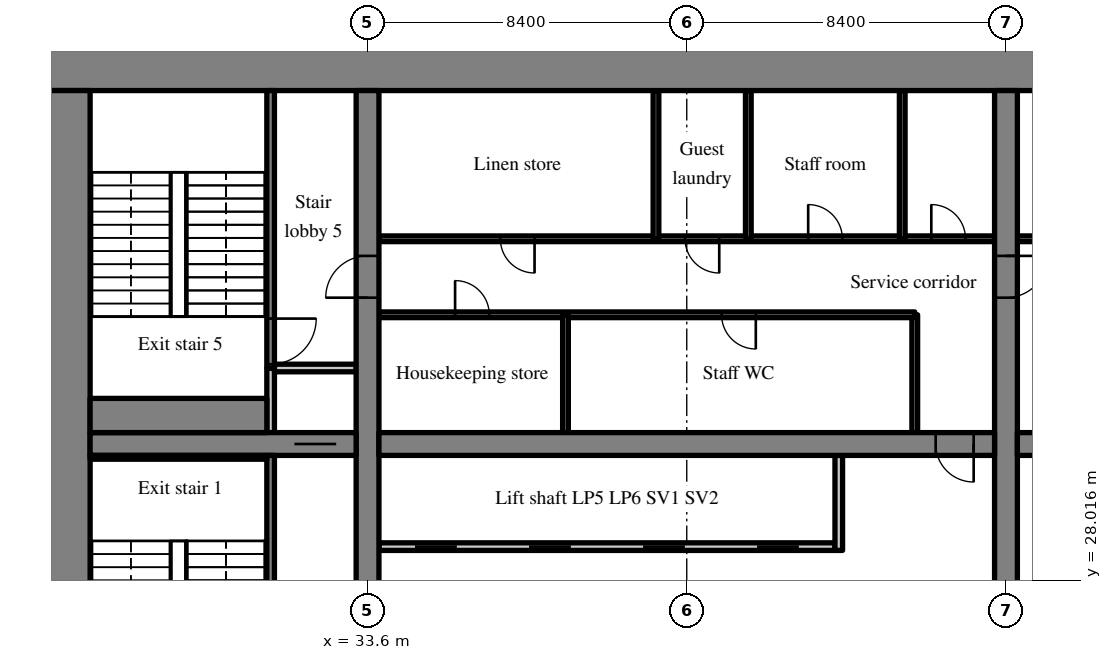
"""IFC4 building model, lengths in metres.
Left out: names, types, materials, properties, quantities, classifications, styles, units other than length and angle.
Written with IfcOpenShell. Run it as: python <this file> out.ifc"""

import sys

from ifc_helpers import new_model, si_unit, direction, frame, frame_2d, origin, place, context, subcontext, project, spatial, rectangle, extrude, source, transform, mapped, element, fill, save


model = new_model("IFC4")
c1 = context("Model", 3, precision=1e-05, world=origin(), true_north=direction((0.0, 1.0)))
c2 = subcontext(c1, "Body", "Model", "MODEL_VIEW")
j1 = project(units=[si_unit("LENGTHUNIT", "METRE"), si_unit("PLANEANGLEUNIT", "RADIAN")], contexts=[c1])
p1 = place(None, origin())
s1 = spatial("IfcSite", under=j1, at=p1, CompositionType="ELEMENT")
p2 = place(p1, origin())
s2 = spatial("IfcBuilding", under=s1, at=p2, CompositionType="ELEMENT")
p3 = place(p2, frame((0.0, 0.0, 18.0)))
s3 = spatial("IfcBuildingStorey", under=s2, at=p3, CompositionType="ELEMENT", Elevation=18.0)
m1 = source(origin(), c2, "Body", "SweptSolid", [
    extrude(rectangle(XDim=50.4, YDim=1.1, at=frame_2d((25.2, 0.0))), origin(), (0.0, 0.0, 1.0), 4.72),
])
p4 = place(p3, frame((25.2, 41.45, 0.0), z_axis=(0.0, 0.0, 1.0), x_axis=(1.0, 0.0, 0.0)))
e1 = element("IfcWall", 1, at=p4, inside=s3, PredefinedType="SHEAR", context=c2, shape_type="MappedRepresentation", body=[
    mapped(m1, transform((0.0, 0.0, 0.0), scale=1.0)),
])
m2 = source(origin(), c2, "Body", "SweptSolid", [
    extrude(rectangle(XDim=17.8, YDim=1.1, at=frame_2d((8.9, 0.0))), origin(), (0.0, 0.0, 1.0), 4.72),
])
p5 = place(p3, frame((25.75, 23.1, 0.0), z_axis=(0.0, 0.0, 1.0), x_axis=(0.0, 1.0, 0.0)))
e2 = element("IfcWall", 2, at=p5, inside=s3, PredefinedType="SHEAR", context=c2, shape_type="MappedRepresentation", body=[
    mapped(m2, transform((0.0, 0.0, 0.0), scale=1.0)),
])
m3 = source(origin(), c2, "Body", "SweptSolid", [
    extrude(rectangle(XDim=17.8, YDim=0.6, at=frame_2d((8.9, 0.0))), origin(), (0.0, 0.0, 1.0), 4.72),
])
p6 = place(p3, frame((33.6, 23.1, 0.0), z_axis=(0.0, 0.0, 1.0), x_axis=(0.0, 1.0, 0.0)))
e3 = element("IfcWall", 3, at=p6, inside=s3, PredefinedType="SHEAR", context=c2, shape_type="MappedRepresentation", body=[
    mapped(m3, transform((0.0, 0.0, 0.0), scale=1.0)),
])
m4 = source(origin(), c2, "Body", "SweptSolid", [
    extrude(rectangle(XDim=1.1, YDim=2.1, at=frame_2d((0.55, 1.05))), frame((0.0, 0.31, 0.0), z_axis=(0.0, -1.0, 0.0), x_axis=(1.0, 0.0, 0.0)), (0.0, 0.0, 1.0), 0.62),
])
p7 = place(p6, frame((12.35, 0.0, 0.0)))
e4 = element("IfcOpeningElement", 4, at=p7, cuts=e3, PredefinedType="OPENING", context=c2, shape_type="MappedRepresentation", body=[
    mapped(m4, transform((0.0, 0.0, 0.0), scale=1.0)),
])
p8 = place(p3, frame((50.4, 23.1, 0.0), z_axis=(0.0, 0.0, 1.0), x_axis=(0.0, 1.0, 0.0)))
e5 = element("IfcWall", 5, at=p8, inside=s3, PredefinedType="SHEAR", context=c2, shape_type="MappedRepresentation", body=[
    mapped(m3, transform((0.0, 0.0, 0.0), scale=1.0)),
])
p9 = place(p8, frame((12.35, 0.0, 0.0)))
e6 = element("IfcOpeningElement", 6, at=p9, cuts=e5, PredefinedType="OPENING", context=c2, shape_type="MappedRepresentation", body=[
    mapped(m4, transform((0.0, 0.0, 0.0), scale=1.0)),
])
m5 = source(origin(), c2, "Body", "SweptSolid", [
    extrude(rectangle(XDim=7.0, YDim=0.6, at=frame_2d((3.5, 0.0))), origin(), (0.0, 0.0, 1.0), 4.72),
])
p10 = place(p3, frame((26.3, 31.6, 0.0), z_axis=(0.0, 0.0, 1.0), x_axis=(1.0, 0.0, 0.0)))
e7 = element("IfcWall", 7, at=p10, inside=s3, PredefinedType="SHEAR", context=c2, shape_type="MappedRepresentation", body=[
    mapped(m5, transform((0.0, 0.0, 0.0), scale=1.0)),
])
p11 = place(p10, frame((5.375, 0.0, 0.0)))
e8 = element("IfcOpeningElement", 8, at=p11, cuts=e7, PredefinedType="OPENING", context=c2, shape_type="MappedRepresentation", body=[
    mapped(m4, transform((0.0, 0.0, 0.0), scale=1.0)),
])
m6 = source(origin(), c2, "Body", "SweptSolid", [
    extrude(rectangle(XDim=16.2, YDim=0.6, at=frame_2d((8.1, 0.0))), origin(), (0.0, 0.0, 1.0), 4.72),
])
p12 = place(p3, frame((33.9, 31.6, 0.0), z_axis=(0.0, 0.0, 1.0), x_axis=(1.0, 0.0, 0.0)))
e9 = element("IfcWall", 9, at=p12, inside=s3, PredefinedType="SHEAR", context=c2, shape_type="MappedRepresentation", body=[
    mapped(m6, transform((0.0, 0.0, 0.0), scale=1.0)),
])
m7 = source(origin(), c2, "Body", "SweptSolid", [
    extrude(rectangle(XDim=1.0, YDim=2.1, at=frame_2d((0.5, 1.05))), frame((0.0, 0.31, 0.0), z_axis=(0.0, -1.0, 0.0), x_axis=(1.0, 0.0, 0.0)), (0.0, 0.0, 1.0), 0.62),
])
p13 = place(p12, frame((14.65, 0.0, 0.0)))
e10 = element("IfcOpeningElement", 10, at=p13, cuts=e9, PredefinedType="OPENING", context=c2, shape_type="MappedRepresentation", body=[
    mapped(m7, transform((0.0, 0.0, 0.0), scale=1.0)),
])
m8 = source(origin(), c2, "Body", "SweptSolid", [
    extrude(rectangle(XDim=16.2, YDim=0.6, at=frame_2d((8.1, 0.0))), origin(), (0.0, 0.0, 1.0), 4.72),
])
p14 = place(p3, frame((50.7, 31.6, 0.0), z_axis=(0.0, 0.0, 1.0), x_axis=(1.0, 0.0, 0.0)))
e11 = element("IfcWall", 11, at=p14, inside=s3, PredefinedType="SHEAR", context=c2, shape_type="MappedRepresentation", body=[
    mapped(m8, transform((0.0, 0.0, 0.0), scale=1.0)),
])
p15 = place(p14, frame((0.55, 0.0, 0.0)))
e12 = element("IfcOpeningElement", 12, at=p15, cuts=e11, PredefinedType="OPENING", context=c2, shape_type="MappedRepresentation", body=[
    mapped(m7, transform((0.0, 0.0, 0.0), scale=1.0)),
])
m9 = source(origin(), c2, "Body", "SweptSolid", [
    extrude(rectangle(XDim=12.0, YDim=0.2, at=frame_2d((6.0, 0.0))), origin(), (0.0, 0.0, 1.0), 4.72),
])
p16 = place(p3, frame((33.9, 28.9, 0.0), z_axis=(0.0, 0.0, 1.0), x_axis=(1.0, 0.0, 0.0)))
e13 = element("IfcWall", 13, at=p16, inside=s3, PredefinedType="SOLIDWALL", context=c2, shape_type="MappedRepresentation", body=[
    mapped(m9, transform((0.0, 0.0, 0.0), scale=1.0)),
])
m10 = source(origin(), c2, "Body", "SweptSolid", [
    extrude(rectangle(XDim=1.1, YDim=2.1, at=frame_2d((0.55, 1.05))), frame((0.0, 0.11, 0.0), z_axis=(0.0, -1.0, 0.0), x_axis=(1.0, 0.0, 0.0)), (0.0, 0.0, 1.0), 0.22),
])
p17 = place(p16, frame((0.95, 0.0, 0.0)))
e14 = element("IfcOpeningElement", 14, at=p17, cuts=e13, PredefinedType="OPENING", context=c2, shape_type="MappedRepresentation", body=[
    mapped(m10, transform((0.0, 0.0, 0.0), scale=1.0)),
])
p18 = place(p16, frame((3.95, 0.0, 0.0)))
e15 = element("IfcOpeningElement", 15, at=p18, cuts=e13, PredefinedType="OPENING", context=c2, shape_type="MappedRepresentation", body=[
    mapped(m10, transform((0.0, 0.0, 0.0), scale=1.0)),
])
p19 = place(p16, frame((6.95, 0.0, 0.0)))
e16 = element("IfcOpeningElement", 16, at=p19, cuts=e13, PredefinedType="OPENING", context=c2, shape_type="MappedRepresentation", body=[
    mapped(m10, transform((0.0, 0.0, 0.0), scale=1.0)),
])
p20 = place(p16, frame((9.95, 0.0, 0.0)))
e17 = element("IfcOpeningElement", 17, at=p20, cuts=e13, PredefinedType="OPENING", context=c2, shape_type="MappedRepresentation", body=[
    mapped(m10, transform((0.0, 0.0, 0.0), scale=1.0)),
])
m11 = source(origin(), c2, "Body", "SweptSolid", [
    extrude(rectangle(XDim=2.5, YDim=0.2, at=frame_2d((1.25, 0.0))), origin(), (0.0, 0.0, 1.0), 4.72),
])
p21 = place(p3, frame((46.0, 28.8, 0.0), z_axis=(0.0, 0.0, 1.0), x_axis=(0.0, 1.0, 0.0)))
e18 = element("IfcWall", 18, at=p21, inside=s3, PredefinedType="SOLIDWALL", context=c2, shape_type="MappedRepresentation", body=[
    mapped(m11, transform((0.0, 0.0, 0.0), scale=1.0)),
])
m12 = source(origin(), c2, "Body", "SweptSolid", [
    extrude(rectangle(XDim=3.1, YDim=0.15, at=frame_2d((1.55, 0.0))), origin(), (0.0, 0.0, 1.0), 4.72),
])
p22 = place(p3, frame((48.0, 31.9, 0.0), z_axis=(0.0, 0.0, 1.0), x_axis=(0.0, 1.0, 0.0)))
e19 = element("IfcWall", 19, at=p22, inside=s3, PredefinedType="PARTITIONING", context=c2, shape_type="MappedRepresentation", body=[
    mapped(m12, transform((0.0, 0.0, 0.0), scale=1.0)),
])
m13 = source(origin(), c2, "Body", "SweptSolid", [
    extrude(rectangle(XDim=14.1, YDim=0.15, at=frame_2d((7.05, 0.0))), origin(), (0.0, 0.0, 1.0), 4.72),
])
p23 = place(p3, frame((33.9, 35.0, 0.0), z_axis=(0.0, 0.0, 1.0), x_axis=(1.0, 0.0, 0.0)))
e20 = element("IfcWall", 20, at=p23, inside=s3, PredefinedType="PARTITIONING", context=c2, shape_type="MappedRepresentation", body=[
    mapped(m13, transform((0.0, 0.0, 0.0), scale=1.0)),
])
m14 = source(origin(), c2, "Body", "SweptSolid", [
    extrude(rectangle(XDim=0.9, YDim=2.1, at=frame_2d((0.45, 1.05))), frame((0.0, 0.085, 0.0), z_axis=(0.0, -1.0, 0.0), x_axis=(1.0, 0.0, 0.0)), (0.0, 0.0, 1.0), 0.17),
])
p24 = place(p23, frame((2.004, 0.0, 0.0)))
e21 = element("IfcOpeningElement", 21, at=p24, cuts=e20, PredefinedType="OPENING", context=c2, shape_type="MappedRepresentation", body=[
    mapped(m14, transform((0.0, 0.0, 0.0), scale=1.0)),
])
p25 = place(p23, frame((9.017, 0.0, 0.0)))
e22 = element("IfcOpeningElement", 22, at=p25, cuts=e20, PredefinedType="OPENING", context=c2, shape_type="MappedRepresentation", body=[
    mapped(m14, transform((0.0, 0.0, 0.0), scale=1.0)),
])
m15 = source(origin(), c2, "Body", "SweptSolid", [
    extrude(rectangle(XDim=16.2, YDim=0.15, at=frame_2d((8.1, 0.0))), origin(), (0.0, 0.0, 1.0), 4.72),
])
p26 = place(p3, frame((33.9, 37.0, 0.0), z_axis=(0.0, 0.0, 1.0), x_axis=(1.0, 0.0, 0.0)))
e23 = element("IfcWall", 23, at=p26, inside=s3, PredefinedType="PARTITIONING", context=c2, shape_type="MappedRepresentation", body=[
    mapped(m15, transform((0.0, 0.0, 0.0), scale=1.0)),
])
p27 = place(p26, frame((3.195, 0.0, 0.0)))
e24 = element("IfcOpeningElement", 24, at=p27, cuts=e23, PredefinedType="OPENING", context=c2, shape_type="MappedRepresentation", body=[
    mapped(m14, transform((0.0, 0.0, 0.0), scale=1.0)),
])
p28 = place(p26, frame((8.055, 0.0, 0.0)))
e25 = element("IfcOpeningElement", 25, at=p28, cuts=e23, PredefinedType="OPENING", context=c2, shape_type="MappedRepresentation", body=[
    mapped(m14, transform((0.0, 0.0, 0.0), scale=1.0)),
])
p29 = place(p26, frame((11.295, 0.0, 0.0)))
e26 = element("IfcOpeningElement", 26, at=p29, cuts=e23, PredefinedType="OPENING", context=c2, shape_type="MappedRepresentation", body=[
    mapped(m14, transform((0.0, 0.0, 0.0), scale=1.0)),
])
p30 = place(p26, frame((14.535, 0.0, 0.0)))
e27 = element("IfcOpeningElement", 27, at=p30, cuts=e23, PredefinedType="OPENING", context=c2, shape_type="MappedRepresentation", body=[
    mapped(m14, transform((0.0, 0.0, 0.0), scale=1.0)),
])
p31 = place(p3, frame((38.809, 31.9, 0.0), z_axis=(0.0, 0.0, 1.0), x_axis=(0.0, 1.0, 0.0)))
e28 = element("IfcWall", 28, at=p31, inside=s3, PredefinedType="PARTITIONING", context=c2, shape_type="MappedRepresentation", body=[
    mapped(m12, transform((0.0, 0.0, 0.0), scale=1.0)),
])
m16 = source(origin(), c2, "Body", "SweptSolid", [
    extrude(rectangle(XDim=3.9, YDim=0.15, at=frame_2d((1.95, 0.0))), origin(), (0.0, 0.0, 1.0), 4.72),
])
for number, where, z_axis, x_axis in (
    (29, (41.19, 37.0, 0.0), (0.0, 0.0, 1.0), (0.0, 1.0, 0.0)),
    (30, (43.62, 37.0, 0.0), (0.0, 0.0, 1.0), (0.0, 1.0, 0.0)),
    (31, (47.67, 37.0, 0.0), (0.0, 0.0, 1.0), (0.0, 1.0, 0.0)),
):
    element("IfcWall", number, at=place(p3, frame(where, z_axis=z_axis, x_axis=x_axis)), inside=s3, PredefinedType="PARTITIONING", context=c2, shape_type="MappedRepresentation", body=[
        mapped(m16, transform((0.0, 0.0, 0.0), scale=1.0)),
    ])
m17 = source(origin(), c2, "Body", "SweptSolid", [
    extrude(rectangle(XDim=16.2, YDim=0.15, at=frame_2d((8.1, 0.0))), origin(), (0.0, 0.0, 1.0), 4.72),
])
p32 = place(p3, frame((66.9, 37.0, 0.0), z_axis=(0.0, 0.0, 1.0), x_axis=(-1.0, 0.0, 0.0)))
e32 = element("IfcWall", 32, at=p32, inside=s3, PredefinedType="PARTITIONING", context=c2, shape_type="MappedRepresentation", body=[
    mapped(m17, transform((0.0, 0.0, 0.0), scale=1.0)),
])
p33 = place(p32, frame((0.765, 0.0, 0.0)))
e33 = element("IfcOpeningElement", 33, at=p33, cuts=e32, PredefinedType="OPENING", context=c2, shape_type="MappedRepresentation", body=[
    mapped(m14, transform((0.0, 0.0, 0.0), scale=1.0)),
])
p34 = place(p32, frame((3.6, 0.0, 0.0)))
e34 = element("IfcOpeningElement", 34, at=p34, cuts=e32, PredefinedType="OPENING", context=c2, shape_type="MappedRepresentation", body=[
    mapped(m14, transform((0.0, 0.0, 0.0), scale=1.0)),
])
p35 = place(p32, frame((9.27, 0.0, 0.0)))
e35 = element("IfcOpeningElement", 35, at=p35, cuts=e32, PredefinedType="OPENING", context=c2, shape_type="MappedRepresentation", body=[
    mapped(m14, transform((0.0, 0.0, 0.0), scale=1.0)),
])
p36 = place(p32, frame((14.535, 0.0, 0.0)))
e36 = element("IfcOpeningElement", 36, at=p36, cuts=e32, PredefinedType="OPENING", context=c2, shape_type="MappedRepresentation", body=[
    mapped(m14, transform((0.0, 0.0, 0.0), scale=1.0)),
])
m18 = source(origin(), c2, "Body", "SweptSolid", [
    extrude(rectangle(XDim=8.2, YDim=0.2, at=frame_2d((4.1, 0.0))), origin(), (0.0, 0.0, 1.0), 4.72),
])
p37 = place(p3, frame((31.05, 23.1, 0.0), z_axis=(0.0, 0.0, 1.0), x_axis=(0.0, 1.0, 0.0)))
e37 = element("IfcWall", 37, at=p37, inside=s3, PredefinedType="SOLIDWALL", context=c2, shape_type="MappedRepresentation", body=[
    mapped(m18, transform((0.0, 0.0, 0.0), scale=1.0)),
])
m19 = source(origin(), c2, "Body", "SweptSolid", [
    extrude(rectangle(XDim=1.2, YDim=2.1, at=frame_2d((0.6, 1.05))), frame((0.0, 0.11, 0.0), z_axis=(0.0, -1.0, 0.0), x_axis=(1.0, 0.0, 0.0)), (0.0, 0.0, 1.0), 0.22),
])
p38 = place(p37, frame((0.5, 0.0, 0.0)))
e38 = element("IfcOpeningElement", 38, at=p38, cuts=e37, PredefinedType="OPENING", context=c2, shape_type="MappedRepresentation", body=[
    mapped(m19, transform((0.0, 0.0, 0.0), scale=1.0)),
])
m20 = source(origin(), c2, "Body", "SweptSolid", [
    extrude(rectangle(XDim=1.7, YDim=0.2, at=frame_2d((0.85, 0.0))), origin(), (0.0, 0.0, 1.0), 4.72),
])
p39 = place(p3, frame((31.05, 31.9, 0.0), z_axis=(0.0, 0.0, 1.0), x_axis=(0.0, 1.0, 0.0)))
e39 = element("IfcWall", 39, at=p39, inside=s3, PredefinedType="SOLIDWALL", context=c2, shape_type="MappedRepresentation", body=[
    mapped(m20, transform((0.0, 0.0, 0.0), scale=1.0)),
])
m21 = source(origin(), c2, "Body", "SweptSolid", [
    extrude(rectangle(XDim=2.15, YDim=0.2, at=frame_2d((1.075, 0.0))), origin(), (0.0, 0.0, 1.0), 4.72),
])
p40 = place(p3, frame((31.15, 33.6, 0.0), z_axis=(0.0, 0.0, 1.0), x_axis=(1.0, 0.0, 0.0)))
e40 = element("IfcWall", 40, at=p40, inside=s3, PredefinedType="SOLIDWALL", context=c2, shape_type="MappedRepresentation", body=[
    mapped(m21, transform((0.0, 0.0, 0.0), scale=1.0)),
])
m22 = source(origin(), c2, "Body", "SweptSolid", [
    extrude(rectangle(XDim=7.3, YDim=0.2, at=frame_2d((3.65, 0.0))), origin(), (0.0, 0.0, 1.0), 4.72),
])
p41 = place(p3, frame((31.05, 33.6, 0.0), z_axis=(0.0, 0.0, 1.0), x_axis=(0.0, 1.0, 0.0)))
e41 = element("IfcWall", 41, at=p41, inside=s3, PredefinedType="SOLIDWALL", context=c2, shape_type="MappedRepresentation", body=[
    mapped(m22, transform((0.0, 0.0, 0.0), scale=1.0)),
])
p42 = place(p41, frame((0.1, 0.0, 0.0)))
e42 = element("IfcOpeningElement", 42, at=p42, cuts=e41, PredefinedType="OPENING", context=c2, shape_type="MappedRepresentation", body=[
    mapped(m19, transform((0.0, 0.0, 0.0), scale=1.0)),
])
m23 = source(origin(), c2, "Body", "SweptSolid", [
    extrude(rectangle(XDim=4.65, YDim=0.1, at=frame_2d((2.325, 0.0))), origin(), (0.0, 0.0, 1.0), 4.72),
])
p43 = place(p3, frame((26.3, 31.25, 0.0), z_axis=(0.0, 0.0, 1.0), x_axis=(1.0, 0.0, 0.0)))
e43 = element("IfcWall", 43, at=p43, inside=s3, PredefinedType="SOLIDWALL", context=c2, shape_type="MappedRepresentation", body=[
    mapped(m23, transform((0.0, 0.0, 0.0), scale=1.0)),
])
m24 = source(origin(), c2, "Body", "SweptSolid", [
    extrude(rectangle(XDim=4.65, YDim=0.9, at=frame_2d((2.325, 0.0))), origin(), (0.0, 0.0, 1.0), 4.72),
])
p44 = place(p3, frame((26.3, 32.35, 0.0), z_axis=(0.0, 0.0, 1.0), x_axis=(1.0, 0.0, 0.0)))
e44 = element("IfcWall", 44, at=p44, inside=s3, PredefinedType="SOLIDWALL", context=c2, shape_type="MappedRepresentation", body=[
    mapped(m24, transform((0.0, 0.0, 0.0), scale=1.0)),
])
m25 = source(origin(), c2, "Body", "SweptSolid", [
    extrude(rectangle(XDim=1.0, YDim=2.1, at=frame_2d((0.5, 1.05))), frame((0.0, 0.025, 0.0), z_axis=(0.0, -1.0, 0.0), x_axis=(1.0, 0.0, 0.0)), (0.0, 0.0, 1.0), 0.05),
])
p45 = place(p13, origin())
e45 = element("IfcDoor", 45, at=p45, inside=s3, OperationType="SINGLE_SWING_RIGHT", PredefinedType="DOOR", context=c2, shape_type="MappedRepresentation", body=[
    mapped(m25, transform((0.0, 0.0, 0.0), scale=1.0)),
])
fill(e10, e45)
m26 = source(origin(), c2, "Body", "SweptSolid", [
    extrude(rectangle(XDim=1.1, YDim=2.1, at=frame_2d((0.55, 1.05))), frame((0.0, 0.025, 0.0), z_axis=(0.0, -1.0, 0.0), x_axis=(1.0, 0.0, 0.0)), (0.0, 0.0, 1.0), 0.05),
])
p46 = place(p17, origin())
e46 = element("IfcDoor", 46, at=p46, inside=s3, OperationType="SLIDING_TO_LEFT", PredefinedType="DOOR", context=c2, shape_type="MappedRepresentation", body=[
    mapped(m26, transform((0.0, 0.0, 0.0), scale=1.0)),
])
fill(e14, e46)
p47 = place(p18, origin())
e47 = element("IfcDoor", 47, at=p47, inside=s3, OperationType="SLIDING_TO_RIGHT", PredefinedType="DOOR", context=c2, shape_type="MappedRepresentation", body=[
    mapped(m26, transform((0.0, 0.0, 0.0), scale=1.0)),
])
fill(e15, e47)
p48 = place(p19, origin())
e48 = element("IfcDoor", 48, at=p48, inside=s3, OperationType="SLIDING_TO_LEFT", PredefinedType="DOOR", context=c2, shape_type="MappedRepresentation", body=[
    mapped(m26, transform((0.0, 0.0, 0.0), scale=1.0)),
])
fill(e16, e48)
p49 = place(p20, origin())
e49 = element("IfcDoor", 49, at=p49, inside=s3, OperationType="SLIDING_TO_RIGHT", PredefinedType="DOOR", context=c2, shape_type="MappedRepresentation", body=[
    mapped(m26, transform((0.0, 0.0, 0.0), scale=1.0)),
])
fill(e17, e49)
m27 = source(origin(), c2, "Body", "SweptSolid", [
    extrude(rectangle(XDim=0.9, YDim=2.1, at=frame_2d((0.45, 1.05))), frame((0.0, 0.025, 0.0), z_axis=(0.0, -1.0, 0.0), x_axis=(1.0, 0.0, 0.0)), (0.0, 0.0, 1.0), 0.05),
])
p50 = place(p24, origin())
e50 = element("IfcDoor", 50, at=p50, inside=s3, OperationType="SINGLE_SWING_LEFT", PredefinedType="DOOR", context=c2, shape_type="MappedRepresentation", body=[
    mapped(m27, transform((0.0, 0.0, 0.0), scale=1.0)),
])
fill(e21, e50)
p51 = place(p25, origin())
e51 = element("IfcDoor", 51, at=p51, inside=s3, OperationType="SINGLE_SWING_RIGHT", PredefinedType="DOOR", context=c2, shape_type="MappedRepresentation", body=[
    mapped(m27, transform((0.0, 0.0, 0.0), scale=1.0)),
])
fill(e22, e51)
p52 = place(p27, origin())
e52 = element("IfcDoor", 52, at=p52, inside=s3, OperationType="SINGLE_SWING_RIGHT", PredefinedType="DOOR", context=c2, shape_type="MappedRepresentation", body=[
    mapped(m27, transform((0.0, 0.0, 0.0), scale=1.0)),
])
fill(e24, e52)
p53 = place(p28, origin())
e53 = element("IfcDoor", 53, at=p53, inside=s3, OperationType="SINGLE_SWING_RIGHT", PredefinedType="DOOR", context=c2, shape_type="MappedRepresentation", body=[
    mapped(m27, transform((0.0, 0.0, 0.0), scale=1.0)),
])
fill(e25, e53)
p54 = place(p29, origin())
e54 = element("IfcDoor", 54, at=p54, inside=s3, OperationType="SINGLE_SWING_LEFT", PredefinedType="DOOR", context=c2, shape_type="MappedRepresentation", body=[
    mapped(m27, transform((0.0, 0.0, 0.0), scale=1.0)),
])
fill(e26, e54)
p55 = place(p30, origin())
e55 = element("IfcDoor", 55, at=p55, inside=s3, OperationType="SINGLE_SWING_LEFT", PredefinedType="DOOR", context=c2, shape_type="MappedRepresentation", body=[
    mapped(m27, transform((0.0, 0.0, 0.0), scale=1.0)),
])
fill(e27, e55)
p56 = place(p11, origin())
e56 = element("IfcDoor", 56, at=p56, inside=s3, OperationType="SLIDING_TO_RIGHT", PredefinedType="DOOR", context=c2, shape_type="MappedRepresentation", body=[
    mapped(m26, transform((0.0, 0.0, 0.0), scale=1.0)),
])
fill(e8, e56)
m28 = source(origin(), c2, "Body", "SweptSolid", [
    extrude(rectangle(XDim=1.2, YDim=2.1, at=frame_2d((0.6, 1.05))), frame((0.0, 0.025, 0.0), z_axis=(0.0, -1.0, 0.0), x_axis=(1.0, 0.0, 0.0)), (0.0, 0.0, 1.0), 0.05),
])
p57 = place(p42, origin())
e57 = element("IfcDoor", 57, at=p57, inside=s3, OperationType="SINGLE_SWING_RIGHT", PredefinedType="DOOR", context=c2, shape_type="MappedRepresentation", body=[
    mapped(m28, transform((0.0, 0.0, 0.0), scale=1.0)),
])
fill(e42, e57)
p58 = place(p7, origin())
e58 = element("IfcDoor", 58, at=p58, inside=s3, OperationType="SINGLE_SWING_LEFT", PredefinedType="DOOR", context=c2, shape_type="MappedRepresentation", body=[
    mapped(m26, transform((0.0, 0.0, 0.0), scale=1.0)),
])
fill(e4, e58)
p59 = place(p9, origin())
e59 = element("IfcDoor", 59, at=p59, inside=s3, OperationType="SINGLE_SWING_RIGHT", PredefinedType="DOOR", context=c2, shape_type="MappedRepresentation", body=[
    mapped(m26, transform((0.0, 0.0, 0.0), scale=1.0)),
])
fill(e6, e59)
save(model, sys.argv[1])
